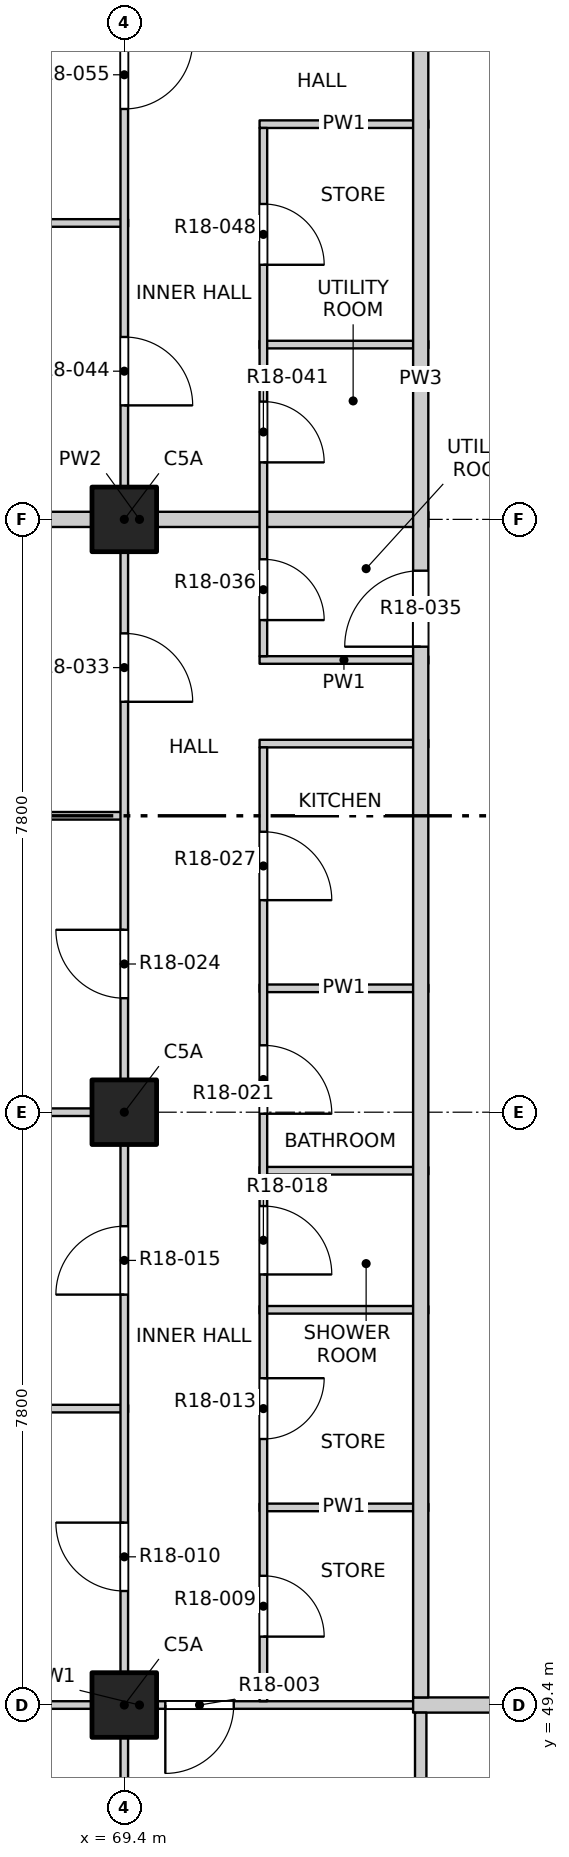
"""IFC4 building model, lengths in metres.
Left out: names, types, materials, properties, quantities, classifications, styles, units other than length and angle.
Written with IfcOpenShell. Run it as: python <this file> out.ifc"""

import sys

from ifc_helpers import new_model, si_unit, direction, frame, frame_2d, origin, origin_2d, place, context, subcontext, project, spatial, rectangle, extrude, element, fill, save


model = new_model("IFC4")
c1 = context("Model", 3, precision=1e-05, world=origin(), true_north=direction((0.0, 1.0)))
c2 = subcontext(c1, "Body", "Model", "MODEL_VIEW")
j1 = project(units=[si_unit("LENGTHUNIT", "METRE"), si_unit("PLANEANGLEUNIT", "RADIAN")], contexts=[c1])
p1 = place(None, origin())
s1 = spatial("IfcSite", under=j1, at=p1, CompositionType="ELEMENT")
p2 = place(p1, origin())
s2 = spatial("IfcBuilding", under=s1, at=p2, CompositionType="ELEMENT")
p3 = place(p2, frame((0.0, 0.0, 186.0)))
s3 = spatial("IfcBuildingStorey", under=s2, at=p3, CompositionType="ELEMENT", Elevation=186.0)
for number, where, z_axis, x_axis in (
    (1, (69.4, 49.4, -0.25), (0.0, 0.0, 1.0), (1.0, 0.0, 0.0)),
    (2, (69.4, 57.2, -0.25), (0.0, 0.0, 1.0), (1.0, 0.0, 0.0)),
    (3, (69.4, 65.0, -0.25), (0.0, 0.0, 1.0), (1.0, 0.0, 0.0)),
):
    element("IfcColumn", number, at=place(p3, frame(where, z_axis=z_axis, x_axis=x_axis)), inside=s3, PredefinedType="COLUMN", context=c2, shape_type="SweptSolid", body=[
        extrude(rectangle(XDim=0.85, YDim=0.85, at=origin_2d()), origin(), (0.0, 0.0, 1.0), 3.4),
    ])
p4 = place(p3, frame((65.8, 49.4, 0.0), z_axis=(0.0, 0.0, 1.0), x_axis=(1.0, 0.0, 0.0)))
e4 = element("IfcWall", 4, at=p4, inside=s3, PredefinedType="PARTITIONING", context=c2, shape_type="SweptSolid", body=[
    extrude(rectangle(XDim=7.6, YDim=0.1, at=frame_2d((3.8, 0.0))), origin(), (0.0, 0.0, 1.0), 3.15),
])
p5 = place(p4, frame((4.14, 0.0, 0.0)))
e5 = element("IfcOpeningElement", 5, at=p5, cuts=e4, PredefinedType="OPENING", context=c2, shape_type="SweptSolid", body=[
    extrude(rectangle(XDim=0.9, YDim=2.1, at=frame_2d((0.45, 1.05))), frame((0.0, 0.06, 0.0), z_axis=(0.0, -1.0, 0.0), x_axis=(1.0, 0.0, 0.0)), (0.0, 0.0, 1.0), 0.12),
])
p6 = place(p3, frame((73.2, 49.4, 0.0), z_axis=(0.0, 0.0, 1.0), x_axis=(1.0, 0.0, 0.0)))
e6 = element("IfcWall", 6, at=p6, inside=s3, PredefinedType="PARTITIONING", context=c2, shape_type="SweptSolid", body=[
    extrude(rectangle(XDim=23.6, YDim=0.2, at=frame_2d((11.8, 0.0))), origin(), (0.0, 0.0, 1.0), 3.15),
])
p7 = place(p6, frame((4.525, 0.0, 0.0)))
e7 = element("IfcOpeningElement", 7, at=p7, cuts=e6, PredefinedType="OPENING", context=c2, shape_type="SweptSolid", body=[
    extrude(rectangle(XDim=1.2, YDim=2.1, at=frame_2d((0.6, 1.05))), frame((0.0, 0.11, 0.0), z_axis=(0.0, -1.0, 0.0), x_axis=(1.0, 0.0, 0.0)), (0.0, 0.0, 1.0), 0.22),
])
p8 = place(p6, frame((12.325, 0.0, 0.0)))
e8 = element("IfcOpeningElement", 8, at=p8, cuts=e6, PredefinedType="OPENING", context=c2, shape_type="SweptSolid", body=[
    extrude(rectangle(XDim=1.2, YDim=2.1, at=frame_2d((0.6, 1.05))), frame((0.0, 0.11, 0.0), z_axis=(0.0, -1.0, 0.0), x_axis=(1.0, 0.0, 0.0)), (0.0, 0.0, 1.0), 0.22),
])
p9 = place(p6, frame((20.125, 0.0, 0.0)))
e9 = element("IfcOpeningElement", 9, at=p9, cuts=e6, PredefinedType="OPENING", context=c2, shape_type="SweptSolid", body=[
    extrude(rectangle(XDim=1.2, YDim=2.1, at=frame_2d((0.6, 1.05))), frame((0.0, 0.11, 0.0), z_axis=(0.0, -1.0, 0.0), x_axis=(1.0, 0.0, 0.0)), (0.0, 0.0, 1.0), 0.22),
])
p10 = place(p3, frame((71.18, 52.0, 0.0), z_axis=(0.0, 0.0, 1.0), x_axis=(1.0, 0.0, 0.0)))
e10 = element("IfcWall", 10, at=p10, inside=s3, PredefinedType="PARTITIONING", context=c2, shape_type="SweptSolid", body=[
    extrude(rectangle(XDim=2.22, YDim=0.1, at=frame_2d((1.11, 0.0))), origin(), (0.0, 0.0, 1.0), 3.15),
])
p11 = place(p3, frame((65.8, 53.3, 0.0), z_axis=(0.0, 0.0, 1.0), x_axis=(1.0, 0.0, 0.0)))
e11 = element("IfcWall", 11, at=p11, inside=s3, PredefinedType="PARTITIONING", context=c2, shape_type="SweptSolid", body=[
    extrude(rectangle(XDim=3.65, YDim=0.1, at=frame_2d((1.825, 0.0))), origin(), (0.0, 0.0, 1.0), 3.15),
])
for number, where, z_axis, x_axis in (
    (12, (71.18, 54.6, 0.0), (0.0, 0.0, 1.0), (1.0, 0.0, 0.0)),
    (13, (71.18, 56.43, 0.0), (0.0, 0.0, 1.0), (1.0, 0.0, 0.0)),
):
    element("IfcWall", number, at=place(p3, frame(where, z_axis=z_axis, x_axis=x_axis)), inside=s3, PredefinedType="PARTITIONING", context=c2, shape_type="SweptSolid", body=[
        extrude(rectangle(XDim=2.22, YDim=0.1, at=frame_2d((1.11, 0.0))), origin(), (0.0, 0.0, 1.0), 3.15),
    ])
p12 = place(p3, frame((65.8, 57.2, 0.0), z_axis=(0.0, 0.0, 1.0), x_axis=(1.0, 0.0, 0.0)))
e14 = element("IfcWall", 14, at=p12, inside=s3, PredefinedType="PARTITIONING", context=c2, shape_type="SweptSolid", body=[
    extrude(rectangle(XDim=3.65, YDim=0.1, at=frame_2d((1.825, 0.0))), origin(), (0.0, 0.0, 1.0), 3.15),
])
p13 = place(p3, frame((71.18, 58.83, 0.0), z_axis=(0.0, 0.0, 1.0), x_axis=(1.0, 0.0, 0.0)))
e15 = element("IfcWall", 15, at=p13, inside=s3, PredefinedType="PARTITIONING", context=c2, shape_type="SweptSolid", body=[
    extrude(rectangle(XDim=2.22, YDim=0.1, at=frame_2d((1.11, 0.0))), origin(), (0.0, 0.0, 1.0), 3.15),
])
p14 = place(p3, frame((65.8, 61.1, 0.0), z_axis=(0.0, 0.0, 1.0), x_axis=(1.0, 0.0, 0.0)))
e16 = element("IfcWall", 16, at=p14, inside=s3, PredefinedType="PARTITIONING", context=c2, shape_type="SweptSolid", body=[
    extrude(rectangle(XDim=3.65, YDim=0.1, at=frame_2d((1.825, 0.0))), origin(), (0.0, 0.0, 1.0), 2.55),
])
for number, where, z_axis, x_axis in (
    (17, (71.18, 62.05, 0.0), (0.0, 0.0, 1.0), (1.0, 0.0, 0.0)),
    (18, (71.18, 63.15, 0.0), (0.0, 0.0, 1.0), (1.0, 0.0, 0.0)),
):
    element("IfcWall", number, at=place(p3, frame(where, z_axis=z_axis, x_axis=x_axis)), inside=s3, PredefinedType="PARTITIONING", context=c2, shape_type="SweptSolid", body=[
        extrude(rectangle(XDim=2.22, YDim=0.1, at=frame_2d((1.11, 0.0))), origin(), (0.0, 0.0, 1.0), 3.15),
    ])
p15 = place(p3, frame((65.8, 65.0, 0.0), z_axis=(0.0, 0.0, 1.0), x_axis=(1.0, 0.0, 0.0)))
e19 = element("IfcWall", 19, at=p15, inside=s3, PredefinedType="PARTITIONING", context=c2, shape_type="SweptSolid", body=[
    extrude(rectangle(XDim=7.6, YDim=0.2, at=frame_2d((3.8, 0.0))), origin(), (0.0, 0.0, 1.0), 3.15),
])
p16 = place(p3, frame((71.18, 67.3, 0.0), z_axis=(0.0, 0.0, 1.0), x_axis=(1.0, 0.0, 0.0)))
e20 = element("IfcWall", 20, at=p16, inside=s3, PredefinedType="PARTITIONING", context=c2, shape_type="SweptSolid", body=[
    extrude(rectangle(XDim=2.22, YDim=0.1, at=frame_2d((1.11, 0.0))), origin(), (0.0, 0.0, 1.0), 3.15),
])
p17 = place(p3, frame((65.8, 68.9, 0.0), z_axis=(0.0, 0.0, 1.0), x_axis=(1.0, 0.0, 0.0)))
e21 = element("IfcWall", 21, at=p17, inside=s3, PredefinedType="PARTITIONING", context=c2, shape_type="SweptSolid", body=[
    extrude(rectangle(XDim=3.65, YDim=0.1, at=frame_2d((1.825, 0.0))), origin(), (0.0, 0.0, 1.0), 2.55),
])
p18 = place(p3, frame((71.18, 70.2, 0.0), z_axis=(0.0, 0.0, 1.0), x_axis=(1.0, 0.0, 0.0)))
e22 = element("IfcWall", 22, at=p18, inside=s3, PredefinedType="PARTITIONING", context=c2, shape_type="SweptSolid", body=[
    extrude(rectangle(XDim=2.22, YDim=0.1, at=frame_2d((1.11, 0.0))), origin(), (0.0, 0.0, 1.0), 3.15),
])
p19 = place(p3, frame((69.4, 45.8, 0.0), z_axis=(0.0, 0.0, 1.0), x_axis=(0.0, 1.0, 0.0)))
e23 = element("IfcWall", 23, at=p19, inside=s3, PredefinedType="PARTITIONING", context=c2, shape_type="SweptSolid", body=[
    extrude(rectangle(XDim=38.4, YDim=0.1, at=frame_2d((19.2, 0.0))), origin(), (0.0, 0.0, 1.0), 3.15),
])
p20 = place(p19, frame((1.05, 0.0, 0.0)))
e24 = element("IfcOpeningElement", 24, at=p20, cuts=e23, PredefinedType="OPENING", context=c2, shape_type="SweptSolid", body=[
    extrude(rectangle(XDim=1.2, YDim=2.1, at=frame_2d((0.6, 1.05))), frame((0.0, 0.06, 0.0), z_axis=(0.0, -1.0, 0.0), x_axis=(1.0, 0.0, 0.0)), (0.0, 0.0, 1.0), 0.12),
])
p21 = place(p19, frame((5.1, 0.0, 0.0)))
e25 = element("IfcOpeningElement", 25, at=p21, cuts=e23, PredefinedType="OPENING", context=c2, shape_type="SweptSolid", body=[
    extrude(rectangle(XDim=0.9, YDim=2.1, at=frame_2d((0.45, 1.05))), frame((0.0, 0.06, 0.0), z_axis=(0.0, -1.0, 0.0), x_axis=(1.0, 0.0, 0.0)), (0.0, 0.0, 1.0), 0.12),
])
p22 = place(p19, frame((9.0, 0.0, 0.0)))
e26 = element("IfcOpeningElement", 26, at=p22, cuts=e23, PredefinedType="OPENING", context=c2, shape_type="SweptSolid", body=[
    extrude(rectangle(XDim=0.9, YDim=2.1, at=frame_2d((0.45, 1.05))), frame((0.0, 0.06, 0.0), z_axis=(0.0, -1.0, 0.0), x_axis=(1.0, 0.0, 0.0)), (0.0, 0.0, 1.0), 0.12),
])
p23 = place(p19, frame((12.9, 0.0, 0.0)))
e27 = element("IfcOpeningElement", 27, at=p23, cuts=e23, PredefinedType="OPENING", context=c2, shape_type="SweptSolid", body=[
    extrude(rectangle(XDim=0.9, YDim=2.1, at=frame_2d((0.45, 1.05))), frame((0.0, 0.06, 0.0), z_axis=(0.0, -1.0, 0.0), x_axis=(1.0, 0.0, 0.0)), (0.0, 0.0, 1.0), 0.12),
])
p24 = place(p19, frame((16.8, 0.0, 0.0)))
e28 = element("IfcOpeningElement", 28, at=p24, cuts=e23, PredefinedType="OPENING", context=c2, shape_type="SweptSolid", body=[
    extrude(rectangle(XDim=0.9, YDim=2.1, at=frame_2d((0.45, 1.05))), frame((0.0, 0.06, 0.0), z_axis=(0.0, -1.0, 0.0), x_axis=(1.0, 0.0, 0.0)), (0.0, 0.0, 1.0), 0.12),
])
p25 = place(p19, frame((20.7, 0.0, 0.0)))
e29 = element("IfcOpeningElement", 29, at=p25, cuts=e23, PredefinedType="OPENING", context=c2, shape_type="SweptSolid", body=[
    extrude(rectangle(XDim=0.9, YDim=2.1, at=frame_2d((0.45, 1.05))), frame((0.0, 0.06, 0.0), z_axis=(0.0, -1.0, 0.0), x_axis=(1.0, 0.0, 0.0)), (0.0, 0.0, 1.0), 0.12),
])
p26 = place(p19, frame((24.6, 0.0, 0.0)))
e30 = element("IfcOpeningElement", 30, at=p26, cuts=e23, PredefinedType="OPENING", context=c2, shape_type="SweptSolid", body=[
    extrude(rectangle(XDim=0.9, YDim=2.1, at=frame_2d((0.45, 1.05))), frame((0.0, 0.06, 0.0), z_axis=(0.0, -1.0, 0.0), x_axis=(1.0, 0.0, 0.0)), (0.0, 0.0, 1.0), 0.12),
])
p27 = place(p19, frame((28.5, 0.0, 0.0)))
e31 = element("IfcOpeningElement", 31, at=p27, cuts=e23, PredefinedType="OPENING", context=c2, shape_type="SweptSolid", body=[
    extrude(rectangle(XDim=0.9, YDim=2.1, at=frame_2d((0.45, 1.05))), frame((0.0, 0.06, 0.0), z_axis=(0.0, -1.0, 0.0), x_axis=(1.0, 0.0, 0.0)), (0.0, 0.0, 1.0), 0.12),
])
p28 = place(p19, frame((32.4, 0.0, 0.0)))
e32 = element("IfcOpeningElement", 32, at=p28, cuts=e23, PredefinedType="OPENING", context=c2, shape_type="SweptSolid", body=[
    extrude(rectangle(XDim=0.9, YDim=2.1, at=frame_2d((0.45, 1.05))), frame((0.0, 0.06, 0.0), z_axis=(0.0, -1.0, 0.0), x_axis=(1.0, 0.0, 0.0)), (0.0, 0.0, 1.0), 0.12),
])
p29 = place(p19, frame((36.15, 0.0, 0.0)))
e33 = element("IfcOpeningElement", 33, at=p29, cuts=e23, PredefinedType="OPENING", context=c2, shape_type="SweptSolid", body=[
    extrude(rectangle(XDim=1.2, YDim=2.1, at=frame_2d((0.6, 1.05))), frame((0.0, 0.06, 0.0), z_axis=(0.0, -1.0, 0.0), x_axis=(1.0, 0.0, 0.0)), (0.0, 0.0, 1.0), 0.12),
])
p30 = place(p3, frame((71.23, 49.45, 0.0), z_axis=(0.0, 0.0, 1.0), x_axis=(0.0, 1.0, 0.0)))
e34 = element("IfcWall", 34, at=p30, inside=s3, PredefinedType="PARTITIONING", context=c2, shape_type="SweptSolid", body=[
    extrude(rectangle(XDim=12.55, YDim=0.1, at=frame_2d((6.275, 0.0))), origin(), (0.0, 0.0, 1.0), 3.15),
])
p31 = place(p30, frame((0.85, 0.0, 0.0)))
e35 = element("IfcOpeningElement", 35, at=p31, cuts=e34, PredefinedType="OPENING", context=c2, shape_type="SweptSolid", body=[
    extrude(rectangle(XDim=0.8, YDim=2.1, at=frame_2d((0.4, 1.05))), frame((0.0, 0.06, 0.0), z_axis=(0.0, -1.0, 0.0), x_axis=(1.0, 0.0, 0.0)), (0.0, 0.0, 1.0), 0.12),
])
p32 = place(p30, frame((3.45, 0.0, 0.0)))
e36 = element("IfcOpeningElement", 36, at=p32, cuts=e34, PredefinedType="OPENING", context=c2, shape_type="SweptSolid", body=[
    extrude(rectangle(XDim=0.8, YDim=2.1, at=frame_2d((0.4, 1.05))), frame((0.0, 0.06, 0.0), z_axis=(0.0, -1.0, 0.0), x_axis=(1.0, 0.0, 0.0)), (0.0, 0.0, 1.0), 0.12),
])
p33 = place(p30, frame((5.615, 0.0, 0.0)))
e37 = element("IfcOpeningElement", 37, at=p33, cuts=e34, PredefinedType="OPENING", context=c2, shape_type="SweptSolid", body=[
    extrude(rectangle(XDim=0.9, YDim=2.1, at=frame_2d((0.45, 1.05))), frame((0.0, 0.06, 0.0), z_axis=(0.0, -1.0, 0.0), x_axis=(1.0, 0.0, 0.0)), (0.0, 0.0, 1.0), 0.12),
])
p34 = place(p30, frame((7.73, 0.0, 0.0)))
e38 = element("IfcOpeningElement", 38, at=p34, cuts=e34, PredefinedType="OPENING", context=c2, shape_type="SweptSolid", body=[
    extrude(rectangle(XDim=0.9, YDim=2.1, at=frame_2d((0.45, 1.05))), frame((0.0, 0.06, 0.0), z_axis=(0.0, -1.0, 0.0), x_axis=(1.0, 0.0, 0.0)), (0.0, 0.0, 1.0), 0.12),
])
p35 = place(p30, frame((10.54, 0.0, 0.0)))
e39 = element("IfcOpeningElement", 39, at=p35, cuts=e34, PredefinedType="OPENING", context=c2, shape_type="SweptSolid", body=[
    extrude(rectangle(XDim=0.9, YDim=2.1, at=frame_2d((0.45, 1.05))), frame((0.0, 0.06, 0.0), z_axis=(0.0, -1.0, 0.0), x_axis=(1.0, 0.0, 0.0)), (0.0, 0.0, 1.0), 0.12),
])
p36 = place(p3, frame((71.23, 63.2, 0.0), z_axis=(0.0, 0.0, 1.0), x_axis=(0.0, 1.0, 0.0)))
e40 = element("IfcWall", 40, at=p36, inside=s3, PredefinedType="PARTITIONING", context=c2, shape_type="SweptSolid", body=[
    extrude(rectangle(XDim=6.95, YDim=0.1, at=frame_2d((3.475, 0.0))), origin(), (0.0, 0.0, 1.0), 3.15),
])
p37 = place(p36, frame((0.475, 0.0, 0.0)))
e41 = element("IfcOpeningElement", 41, at=p37, cuts=e40, PredefinedType="OPENING", context=c2, shape_type="SweptSolid", body=[
    extrude(rectangle(XDim=0.8, YDim=2.1, at=frame_2d((0.4, 1.05))), frame((0.0, 0.06, 0.0), z_axis=(0.0, -1.0, 0.0), x_axis=(1.0, 0.0, 0.0)), (0.0, 0.0, 1.0), 0.12),
])
p38 = place(p36, frame((2.55, 0.0, 0.0)))
e42 = element("IfcOpeningElement", 42, at=p38, cuts=e40, PredefinedType="OPENING", context=c2, shape_type="SweptSolid", body=[
    extrude(rectangle(XDim=0.8, YDim=2.1, at=frame_2d((0.4, 1.05))), frame((0.0, 0.06, 0.0), z_axis=(0.0, -1.0, 0.0), x_axis=(1.0, 0.0, 0.0)), (0.0, 0.0, 1.0), 0.12),
])
p39 = place(p36, frame((5.15, 0.0, 0.0)))
e43 = element("IfcOpeningElement", 43, at=p39, cuts=e40, PredefinedType="OPENING", context=c2, shape_type="SweptSolid", body=[
    extrude(rectangle(XDim=0.8, YDim=2.1, at=frame_2d((0.4, 1.05))), frame((0.0, 0.06, 0.0), z_axis=(0.0, -1.0, 0.0), x_axis=(1.0, 0.0, 0.0)), (0.0, 0.0, 1.0), 0.12),
])
p40 = place(p3, frame((73.3, 45.8, 0.0), z_axis=(0.0, 0.0, 1.0), x_axis=(0.0, 1.0, 0.0)))
e44 = element("IfcWall", 44, at=p40, inside=s3, PredefinedType="PARTITIONING", context=c2, shape_type="SweptSolid", body=[
    extrude(rectangle(XDim=3.5, YDim=0.15, at=frame_2d((1.75, 0.0))), origin(), (0.0, 0.0, 1.0), 3.15),
])
p41 = place(p3, frame((73.3, 49.5, 0.0), z_axis=(0.0, 0.0, 1.0), x_axis=(0.0, 1.0, 0.0)))
e45 = element("IfcWall", 45, at=p41, inside=s3, PredefinedType="PARTITIONING", context=c2, shape_type="SweptSolid", body=[
    extrude(rectangle(XDim=34.7, YDim=0.2, at=frame_2d((17.35, 0.0))), origin(), (0.0, 0.0, 1.0), 3.15),
])
p42 = place(p41, frame((13.825, 0.0, 0.0)))
e46 = element("IfcOpeningElement", 46, at=p42, cuts=e45, PredefinedType="OPENING", context=c2, shape_type="SweptSolid", body=[
    extrude(rectangle(XDim=1.0, YDim=2.1, at=frame_2d((0.5, 1.05))), frame((0.0, 0.11, 0.0), z_axis=(0.0, -1.0, 0.0), x_axis=(1.0, 0.0, 0.0)), (0.0, 0.0, 1.0), 0.22),
])
p43 = place(p41, frame((21.975, 0.0, 0.0)))
e47 = element("IfcOpeningElement", 47, at=p43, cuts=e45, PredefinedType="OPENING", context=c2, shape_type="SweptSolid", body=[
    extrude(rectangle(XDim=1.0, YDim=2.1, at=frame_2d((0.5, 1.05))), frame((0.0, 0.11, 0.0), z_axis=(0.0, -1.0, 0.0), x_axis=(1.0, 0.0, 0.0)), (0.0, 0.0, 1.0), 0.22),
])
p44 = place(p5, origin())
e48 = element("IfcDoor", 48, at=p44, inside=s3, OperationType="SINGLE_SWING_RIGHT", PredefinedType="DOOR", context=c2, shape_type="SweptSolid", body=[
    extrude(rectangle(XDim=0.9, YDim=2.1, at=frame_2d((0.45, 1.05))), frame((0.0, 0.025, 0.0), z_axis=(0.0, -1.0, 0.0), x_axis=(1.0, 0.0, 0.0)), (0.0, 0.0, 1.0), 0.05),
])
fill(e5, e48)
p45 = place(p31, origin())
e49 = element("IfcDoor", 49, at=p45, inside=s3, OperationType="SINGLE_SWING_RIGHT", PredefinedType="DOOR", context=c2, shape_type="SweptSolid", body=[
    extrude(rectangle(XDim=0.8, YDim=2.1, at=frame_2d((0.4, 1.05))), frame((0.0, 0.025, 0.0), z_axis=(0.0, -1.0, 0.0), x_axis=(1.0, 0.0, 0.0)), (0.0, 0.0, 1.0), 0.05),
])
fill(e35, e49)
p46 = place(p21, origin())
e50 = element("IfcDoor", 50, at=p46, inside=s3, OperationType="SINGLE_SWING_RIGHT", PredefinedType="DOOR", context=c2, shape_type="SweptSolid", body=[
    extrude(rectangle(XDim=0.9, YDim=2.1, at=frame_2d((0.45, 1.05))), frame((0.0, 0.025, 0.0), z_axis=(0.0, -1.0, 0.0), x_axis=(1.0, 0.0, 0.0)), (0.0, 0.0, 1.0), 0.05),
])
fill(e25, e50)
p47 = place(p32, origin())
e51 = element("IfcDoor", 51, at=p47, inside=s3, OperationType="SINGLE_SWING_LEFT", PredefinedType="DOOR", context=c2, shape_type="SweptSolid", body=[
    extrude(rectangle(XDim=0.8, YDim=2.1, at=frame_2d((0.4, 1.05))), frame((0.0, 0.025, 0.0), z_axis=(0.0, -1.0, 0.0), x_axis=(1.0, 0.0, 0.0)), (0.0, 0.0, 1.0), 0.05),
])
fill(e36, e51)
p48 = place(p22, origin())
e52 = element("IfcDoor", 52, at=p48, inside=s3, OperationType="SINGLE_SWING_LEFT", PredefinedType="DOOR", context=c2, shape_type="SweptSolid", body=[
    extrude(rectangle(XDim=0.9, YDim=2.1, at=frame_2d((0.45, 1.05))), frame((0.0, 0.025, 0.0), z_axis=(0.0, -1.0, 0.0), x_axis=(1.0, 0.0, 0.0)), (0.0, 0.0, 1.0), 0.05),
])
fill(e26, e52)
p49 = place(p33, origin())
e53 = element("IfcDoor", 53, at=p49, inside=s3, OperationType="SINGLE_SWING_RIGHT", PredefinedType="DOOR", context=c2, shape_type="SweptSolid", body=[
    extrude(rectangle(XDim=0.9, YDim=2.1, at=frame_2d((0.45, 1.05))), frame((0.0, 0.025, 0.0), z_axis=(0.0, -1.0, 0.0), x_axis=(1.0, 0.0, 0.0)), (0.0, 0.0, 1.0), 0.05),
])
fill(e37, e53)
p50 = place(p34, origin())
e54 = element("IfcDoor", 54, at=p50, inside=s3, OperationType="SINGLE_SWING_RIGHT", PredefinedType="DOOR", context=c2, shape_type="SweptSolid", body=[
    extrude(rectangle(XDim=0.9, YDim=2.1, at=frame_2d((0.45, 1.05))), frame((0.0, 0.025, 0.0), z_axis=(0.0, -1.0, 0.0), x_axis=(1.0, 0.0, 0.0)), (0.0, 0.0, 1.0), 0.05),
])
fill(e38, e54)
p51 = place(p23, origin())
e55 = element("IfcDoor", 55, at=p51, inside=s3, OperationType="SINGLE_SWING_RIGHT", PredefinedType="DOOR", context=c2, shape_type="SweptSolid", body=[
    extrude(rectangle(XDim=0.9, YDim=2.1, at=frame_2d((0.45, 1.05))), frame((0.0, 0.025, 0.0), z_axis=(0.0, -1.0, 0.0), x_axis=(1.0, 0.0, 0.0)), (0.0, 0.0, 1.0), 0.05),
])
fill(e27, e55)
p52 = place(p35, origin())
e56 = element("IfcDoor", 56, at=p52, inside=s3, OperationType="SINGLE_SWING_RIGHT", PredefinedType="DOOR", context=c2, shape_type="SweptSolid", body=[
    extrude(rectangle(XDim=0.9, YDim=2.1, at=frame_2d((0.45, 1.05))), frame((0.0, 0.025, 0.0), z_axis=(0.0, -1.0, 0.0), x_axis=(1.0, 0.0, 0.0)), (0.0, 0.0, 1.0), 0.05),
])
fill(e39, e56)
p53 = place(p24, origin())
e57 = element("IfcDoor", 57, at=p53, inside=s3, OperationType="SINGLE_SWING_RIGHT", PredefinedType="DOOR", context=c2, shape_type="SweptSolid", body=[
    extrude(rectangle(XDim=0.9, YDim=2.1, at=frame_2d((0.45, 1.05))), frame((0.0, 0.025, 0.0), z_axis=(0.0, -1.0, 0.0), x_axis=(1.0, 0.0, 0.0)), (0.0, 0.0, 1.0), 0.05),
])
fill(e28, e57)
p54 = place(p42, origin())
e58 = element("IfcDoor", 58, at=p54, inside=s3, OperationType="SINGLE_SWING_RIGHT", PredefinedType="DOOR", context=c2, shape_type="SweptSolid", body=[
    extrude(rectangle(XDim=1.0, YDim=2.1, at=frame_2d((0.5, 1.05))), frame((0.0, 0.025, 0.0), z_axis=(0.0, -1.0, 0.0), x_axis=(1.0, 0.0, 0.0)), (0.0, 0.0, 1.0), 0.05),
])
fill(e46, e58)
p55 = place(p37, origin())
e59 = element("IfcDoor", 59, at=p55, inside=s3, OperationType="SINGLE_SWING_RIGHT", PredefinedType="DOOR", context=c2, shape_type="SweptSolid", body=[
    extrude(rectangle(XDim=0.8, YDim=2.1, at=frame_2d((0.4, 1.05))), frame((0.0, 0.025, 0.0), z_axis=(0.0, -1.0, 0.0), x_axis=(1.0, 0.0, 0.0)), (0.0, 0.0, 1.0), 0.05),
])
fill(e41, e59)
p56 = place(p38, origin())
e60 = element("IfcDoor", 60, at=p56, inside=s3, OperationType="SINGLE_SWING_RIGHT", PredefinedType="DOOR", context=c2, shape_type="SweptSolid", body=[
    extrude(rectangle(XDim=0.8, YDim=2.1, at=frame_2d((0.4, 1.05))), frame((0.0, 0.025, 0.0), z_axis=(0.0, -1.0, 0.0), x_axis=(1.0, 0.0, 0.0)), (0.0, 0.0, 1.0), 0.05),
])
fill(e42, e60)
p57 = place(p25, origin())
e61 = element("IfcDoor", 61, at=p57, inside=s3, OperationType="SINGLE_SWING_RIGHT", PredefinedType="DOOR", context=c2, shape_type="SweptSolid", body=[
    extrude(rectangle(XDim=0.9, YDim=2.1, at=frame_2d((0.45, 1.05))), frame((0.0, 0.025, 0.0), z_axis=(0.0, -1.0, 0.0), x_axis=(1.0, 0.0, 0.0)), (0.0, 0.0, 1.0), 0.05),
])
fill(e29, e61)
p58 = place(p39, origin())
e62 = element("IfcDoor", 62, at=p58, inside=s3, OperationType="SINGLE_SWING_RIGHT", PredefinedType="DOOR", context=c2, shape_type="SweptSolid", body=[
    extrude(rectangle(XDim=0.8, YDim=2.1, at=frame_2d((0.4, 1.05))), frame((0.0, 0.025, 0.0), z_axis=(0.0, -1.0, 0.0), x_axis=(1.0, 0.0, 0.0)), (0.0, 0.0, 1.0), 0.05),
])
fill(e43, e62)
p59 = place(p26, origin())
e63 = element("IfcDoor", 63, at=p59, inside=s3, OperationType="SINGLE_SWING_LEFT", PredefinedType="DOOR", context=c2, shape_type="SweptSolid", body=[
    extrude(rectangle(XDim=0.9, YDim=2.1, at=frame_2d((0.45, 1.05))), frame((0.0, 0.025, 0.0), z_axis=(0.0, -1.0, 0.0), x_axis=(1.0, 0.0, 0.0)), (0.0, 0.0, 1.0), 0.05),
])
fill(e30, e63)
save(model, sys.argv[1])
